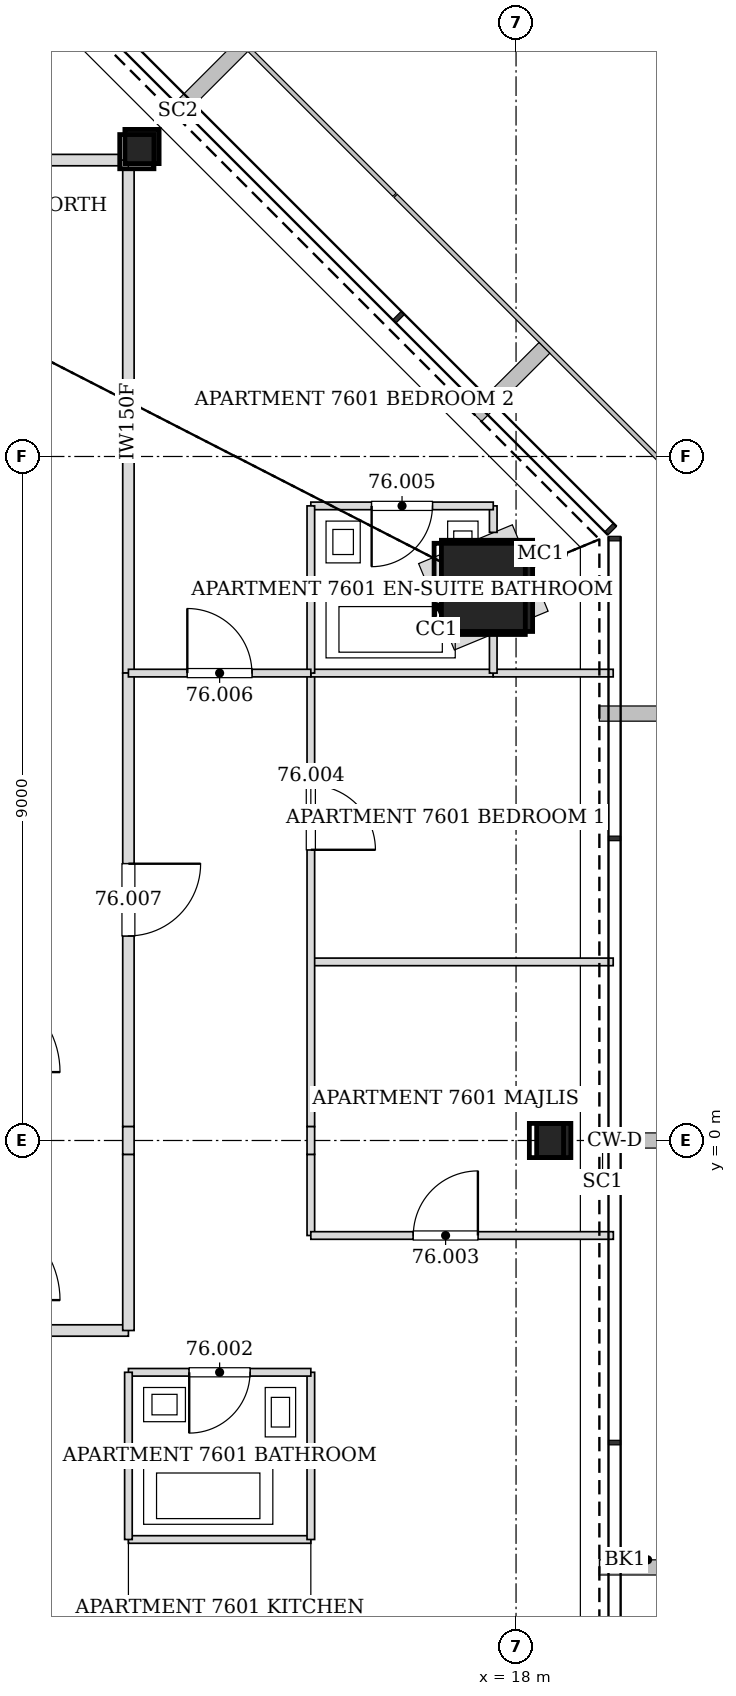
"""IFC4 building model, lengths in metres.
Left out: names, types, materials, properties, quantities, classifications, styles, units other than length and angle.
Written with IfcOpenShell. Run it as: python <this file> out.ifc"""

import sys

from ifc_helpers import new_model, si_unit, direction, frame, frame_2d, origin, origin_2d, place, context, subcontext, project, spatial, rectangle, hollow_rectangle, extrude, element, fill, save


model = new_model("IFC4")
c1 = context("Model", 3, precision=1e-05, world=origin(), true_north=direction((0.0, 1.0)))
c2 = subcontext(c1, "Body", "Model", "MODEL_VIEW")
j1 = project(units=[si_unit("LENGTHUNIT", "METRE"), si_unit("PLANEANGLEUNIT", "RADIAN")], contexts=[c1])
p1 = place(None, origin())
s1 = spatial("IfcSite", under=j1, at=p1, CompositionType="ELEMENT")
p2 = place(p1, origin())
s2 = spatial("IfcBuilding", under=s1, at=p2, CompositionType="ELEMENT")
p3 = place(p2, frame((0.0, 0.0, 308.2)))
s3 = spatial("IfcBuildingStorey", under=s2, at=p3, CompositionType="ELEMENT", Elevation=308.2)
p4 = place(p3, frame((17.618, 7.298, 0.0), z_axis=(-0.028277121884, -0.011698403216, 0.999531666202), x_axis=(0.382282742426, -0.924045401938, 0.0)))
e1 = element("IfcColumn", 1, at=p4, inside=s3, PredefinedType="COLUMN", context=c2, shape_type="SweptSolid", body=[
    extrude(hollow_rectangle(XDim=1.2, YDim=1.2, WallThickness=0.055, at=origin_2d()), origin(), (0.0, 0.0, 1.0), 3.402),
])
for number, where, z_axis, x_axis in (
    (2, (18.496, 0.0, 0.0), (-0.028, 0.0, 1.0), (0.0, -1.0, 0.0)),
    (3, (13.079, 13.079, 0.0), (-0.02, -0.02, 1.0), (0.707, -0.707, 0.0)),
):
    element("IfcColumn", number, at=place(p3, frame(where, z_axis=z_axis, x_axis=x_axis)), inside=s3, PredefinedType="COLUMN", context=c2, shape_type="SweptSolid", body=[
        extrude(hollow_rectangle(XDim=0.45, YDim=0.45, WallThickness=0.02, at=origin_2d()), origin(), (0.0, 0.0, 1.0), 3.402),
    ])
p5 = place(p3, frame((12.9, 6.149, 0.0), z_axis=(0.0, 0.0, 1.0), x_axis=(0.0, 1.0, 0.0)))
e4 = element("IfcWall", 4, at=p5, inside=s3, PredefinedType="PARTITIONING", context=c2, shape_type="SweptSolid", body=[
    extrude(rectangle(XDim=6.627, YDim=0.15, at=frame_2d((3.314, 0.0))), origin(), (0.0, 0.0, 1.0), 2.349),
])
p6 = place(p3, frame((11.25, -2.5, 0.0), z_axis=(0.0, 0.0, 1.0), x_axis=(1.0, 0.0, 0.0)))
e5 = element("IfcWall", 5, at=p6, inside=s3, PredefinedType="PARTITIONING", context=c2, shape_type="SweptSolid", body=[
    extrude(rectangle(XDim=1.65, YDim=0.15, at=frame_2d((0.825, 0.0))), origin(), (0.0, 0.0, 1.0), 3.2),
])
p7 = place(p3, frame((12.9, -2.5, 0.0), z_axis=(0.0, 0.0, 1.0), x_axis=(0.0, 1.0, 0.0)))
e6 = element("IfcWall", 6, at=p7, inside=s3, PredefinedType="PARTITIONING", context=c2, shape_type="SweptSolid", body=[
    extrude(rectangle(XDim=2.318, YDim=0.15, at=frame_2d((1.159, 0.0))), origin(), (0.0, 0.0, 1.0), 3.2),
])
p8 = place(p3, frame((12.9, 0.182, 0.0), z_axis=(0.0, 0.0, 1.0), x_axis=(0.0, 1.0, 0.0)))
e7 = element("IfcWall", 7, at=p8, inside=s3, PredefinedType="PARTITIONING", context=c2, shape_type="SweptSolid", body=[
    extrude(rectangle(XDim=5.969, YDim=0.15, at=frame_2d((2.984, 0.0))), origin(), (0.0, 0.0, 1.0), 3.2),
])
p9 = place(p8, frame((2.509, 0.0, 0.0)))
e8 = element("IfcOpeningElement", 8, at=p9, cuts=e7, PredefinedType="OPENING", context=c2, shape_type="SweptSolid", body=[
    extrude(rectangle(XDim=0.95, YDim=2.1, at=frame_2d((0.475, 1.05))), frame((0.0, 0.085, 0.0), z_axis=(0.0, -1.0, 0.0), x_axis=(1.0, 0.0, 0.0)), (0.0, 0.0, 1.0), 0.17),
])
p10 = place(p3, frame((12.9, -0.182, 0.0), z_axis=(0.0, 0.0, 1.0), x_axis=(0.0, 1.0, 0.0)))
e9 = element("IfcWall", 9, at=p10, inside=s3, PredefinedType="PARTITIONING", context=c2, shape_type="SweptSolid", body=[
    extrude(rectangle(XDim=0.365, YDim=0.15, at=frame_2d((0.182, 0.0))), origin(), (0.0, 0.0, 1.0), 2.268),
])
p11 = place(p3, frame((12.776, 12.9, 0.0), z_axis=(0.0, 0.0, 1.0), x_axis=(-1.0, 0.0, 0.0)))
e10 = element("IfcWall", 10, at=p11, inside=s3, PredefinedType="PARTITIONING", context=c2, shape_type="SweptSolid", body=[
    extrude(rectangle(XDim=6.627, YDim=0.15, at=frame_2d((3.314, 0.0))), origin(), (0.0, 0.0, 1.0), 2.349),
])
p12 = place(p3, frame((15.3, -5.25, 0.0), z_axis=(0.0, 0.0, 1.0), x_axis=(-1.0, 0.0, 0.0)))
e11 = element("IfcWall", 11, at=p12, inside=s3, PredefinedType="PARTITIONING", context=c2, shape_type="SweptSolid", body=[
    extrude(rectangle(XDim=2.4, YDim=0.1, at=frame_2d((1.2, 0.0))), origin(), (0.0, 0.0, 1.0), 2.588),
])
p13 = place(p3, frame((15.3, -5.25, 0.0), z_axis=(0.0, 0.0, 1.0), x_axis=(0.0, 1.0, 0.0)))
e12 = element("IfcWall", 12, at=p13, inside=s3, PredefinedType="PARTITIONING", context=c2, shape_type="SweptSolid", body=[
    extrude(rectangle(XDim=2.2, YDim=0.1, at=frame_2d((1.1, 0.0))), origin(), (0.0, 0.0, 1.0), 3.2),
])
p14 = place(p3, frame((15.3, -3.05, 0.0), z_axis=(0.0, 0.0, 1.0), x_axis=(-1.0, 0.0, 0.0)))
e13 = element("IfcWall", 13, at=p14, inside=s3, PredefinedType="PARTITIONING", context=c2, shape_type="SweptSolid", body=[
    extrude(rectangle(XDim=2.4, YDim=0.1, at=frame_2d((1.2, 0.0))), origin(), (0.0, 0.0, 1.0), 2.588),
])
p15 = place(p14, frame((0.8, 0.0, 0.0)))
e14 = element("IfcOpeningElement", 14, at=p15, cuts=e13, PredefinedType="OPENING", context=c2, shape_type="SweptSolid", body=[
    extrude(rectangle(XDim=0.8, YDim=2.1, at=frame_2d((0.4, 1.05))), frame((0.0, 0.06, 0.0), z_axis=(0.0, -1.0, 0.0), x_axis=(1.0, 0.0, 0.0)), (0.0, 0.0, 1.0), 0.12),
])
p16 = place(p3, frame((12.9, -3.05, 0.0), z_axis=(0.0, 0.0, 1.0), x_axis=(0.0, -1.0, 0.0)))
e15 = element("IfcWall", 15, at=p16, inside=s3, PredefinedType="PARTITIONING", context=c2, shape_type="SweptSolid", body=[
    extrude(rectangle(XDim=2.2, YDim=0.1, at=frame_2d((1.1, 0.0))), origin(), (0.0, 0.0, 1.0), 3.2),
])
p17 = place(p3, frame((19.278, 2.35, 0.0), z_axis=(0.0, 0.0, 1.0), x_axis=(-1.0, 0.0, 0.0)))
e16 = element("IfcWall", 16, at=p17, inside=s3, PredefinedType="PARTITIONING", context=c2, shape_type="SweptSolid", body=[
    extrude(rectangle(XDim=3.978, YDim=0.1, at=frame_2d((1.989, 0.0))), origin(), (0.0, 0.0, 1.0), 2.657),
])
p18 = place(p3, frame((15.3, 0.182, 0.0), z_axis=(0.0, 0.0, 1.0), x_axis=(0.0, 1.0, 0.0)))
e17 = element("IfcWall", 17, at=p18, inside=s3, PredefinedType="PARTITIONING", context=c2, shape_type="SweptSolid", body=[
    extrude(rectangle(XDim=5.968, YDim=0.1, at=frame_2d((2.984, 0.0))), origin(), (0.0, 0.0, 1.0), 3.2),
])
p19 = place(p18, frame((3.643, 0.0, 0.0)))
e18 = element("IfcOpeningElement", 18, at=p19, cuts=e17, PredefinedType="OPENING", context=c2, shape_type="SweptSolid", body=[
    extrude(rectangle(XDim=0.85, YDim=2.1, at=frame_2d((0.425, 1.05))), frame((0.0, 0.06, 0.0), z_axis=(0.0, -1.0, 0.0), x_axis=(1.0, 0.0, 0.0)), (0.0, 0.0, 1.0), 0.12),
])
p20 = place(p3, frame((15.3, -0.182, 0.0), z_axis=(0.0, 0.0, 1.0), x_axis=(0.0, -1.0, 0.0)))
e19 = element("IfcWall", 19, at=p20, inside=s3, PredefinedType="PARTITIONING", context=c2, shape_type="SweptSolid", body=[
    extrude(rectangle(XDim=1.068, YDim=0.1, at=frame_2d((0.534, 0.0))), origin(), (0.0, 0.0, 1.0), 3.2),
])
p21 = place(p3, frame((15.3, 0.182, 0.0), z_axis=(0.0, 0.0, 1.0), x_axis=(0.0, -1.0, 0.0)))
e20 = element("IfcWall", 20, at=p21, inside=s3, PredefinedType="PARTITIONING", context=c2, shape_type="SweptSolid", body=[
    extrude(rectangle(XDim=0.365, YDim=0.1, at=frame_2d((0.182, 0.0))), origin(), (0.0, 0.0, 1.0), 2.268),
])
p22 = place(p3, frame((15.3, -1.25, 0.0), z_axis=(0.0, 0.0, 1.0), x_axis=(1.0, 0.0, 0.0)))
e21 = element("IfcWall", 21, at=p22, inside=s3, PredefinedType="PARTITIONING", context=c2, shape_type="SweptSolid", body=[
    extrude(rectangle(XDim=3.98, YDim=0.1, at=frame_2d((1.99, 0.0))), origin(), (0.0, 0.0, 1.0), 2.657),
])
p23 = place(p22, frame((1.348, 0.0, 0.0)))
e22 = element("IfcOpeningElement", 22, at=p23, cuts=e21, PredefinedType="OPENING", context=c2, shape_type="SweptSolid", body=[
    extrude(rectangle(XDim=0.85, YDim=2.1, at=frame_2d((0.425, 1.05))), frame((0.0, 0.06, 0.0), z_axis=(0.0, -1.0, 0.0), x_axis=(1.0, 0.0, 0.0)), (0.0, 0.0, 1.0), 0.12),
])
p24 = place(p3, frame((17.701, 6.15, 0.0), z_axis=(0.0, 0.0, 1.0), x_axis=(-1.0, 0.0, 0.0)))
e23 = element("IfcWall", 23, at=p24, inside=s3, PredefinedType="PARTITIONING", context=c2, shape_type="SweptSolid", body=[
    extrude(rectangle(XDim=2.401, YDim=0.1, at=frame_2d((1.2, 0.0))), origin(), (0.0, 0.0, 1.0), 2.657),
])
p25 = place(p3, frame((19.278, 6.15, 0.0), z_axis=(0.0, 0.0, 1.0), x_axis=(-1.0, 0.0, 0.0)))
e24 = element("IfcWall", 24, at=p25, inside=s3, PredefinedType="PARTITIONING", context=c2, shape_type="SweptSolid", body=[
    extrude(rectangle(XDim=1.579, YDim=0.1, at=frame_2d((0.79, 0.0))), origin(), (0.0, 0.0, 1.0), 2.664),
])
p26 = place(p3, frame((17.7, 6.15, 0.0), z_axis=(0.0, 0.0, 1.0), x_axis=(0.0, 1.0, 0.0)))
e25 = element("IfcWall", 25, at=p26, inside=s3, PredefinedType="PARTITIONING", context=c2, shape_type="SweptSolid", body=[
    extrude(rectangle(XDim=0.512, YDim=0.1, at=frame_2d((0.256, 0.0))), origin(), (0.0, 0.0, 1.0), 2.664),
])
p27 = place(p3, frame((17.7, 8.002, 0.0), z_axis=(0.0, 0.0, 1.0), x_axis=(0.0, 1.0, 0.0)))
e26 = element("IfcWall", 26, at=p27, inside=s3, PredefinedType="PARTITIONING", context=c2, shape_type="SweptSolid", body=[
    extrude(rectangle(XDim=0.348, YDim=0.1, at=frame_2d((0.174, 0.0))), origin(), (0.0, 0.0, 1.0), 3.2),
])
p28 = place(p3, frame((17.7, 8.35, 0.0), z_axis=(0.0, 0.0, 1.0), x_axis=(-1.0, 0.0, 0.0)))
e27 = element("IfcWall", 27, at=p28, inside=s3, PredefinedType="PARTITIONING", context=c2, shape_type="SweptSolid", body=[
    extrude(rectangle(XDim=2.4, YDim=0.1, at=frame_2d((1.2, 0.0))), origin(), (0.0, 0.0, 1.0), 2.349),
])
p29 = place(p28, frame((0.8, 0.0, 0.0)))
e28 = element("IfcOpeningElement", 28, at=p29, cuts=e27, PredefinedType="OPENING", context=c2, shape_type="SweptSolid", body=[
    extrude(rectangle(XDim=0.8, YDim=2.1, at=frame_2d((0.4, 1.05))), frame((0.0, 0.06, 0.0), z_axis=(0.0, -1.0, 0.0), x_axis=(1.0, 0.0, 0.0)), (0.0, 0.0, 1.0), 0.12),
])
p30 = place(p3, frame((15.3, 8.35, 0.0), z_axis=(0.0, 0.0, 1.0), x_axis=(0.0, -1.0, 0.0)))
e29 = element("IfcWall", 29, at=p30, inside=s3, PredefinedType="PARTITIONING", context=c2, shape_type="SweptSolid", body=[
    extrude(rectangle(XDim=2.2, YDim=0.1, at=frame_2d((1.1, 0.0))), origin(), (0.0, 0.0, 1.0), 2.349),
])
p31 = place(p3, frame((12.9, 6.15, 0.0), z_axis=(0.0, 0.0, 1.0), x_axis=(1.0, 0.0, 0.0)))
e30 = element("IfcWall", 30, at=p31, inside=s3, PredefinedType="PARTITIONING", context=c2, shape_type="SweptSolid", body=[
    extrude(rectangle(XDim=2.4, YDim=0.1, at=frame_2d((1.2, 0.0))), origin(), (0.0, 0.0, 1.0), 2.588),
])
p32 = place(p31, frame((0.775, 0.0, 0.0)))
e31 = element("IfcOpeningElement", 31, at=p32, cuts=e30, PredefinedType="OPENING", context=c2, shape_type="SweptSolid", body=[
    extrude(rectangle(XDim=0.85, YDim=2.1, at=frame_2d((0.425, 1.05))), frame((0.0, 0.06, 0.0), z_axis=(0.0, -1.0, 0.0), x_axis=(1.0, 0.0, 0.0)), (0.0, 0.0, 1.0), 0.12),
])
p33 = place(p15, origin())
e32 = element("IfcDoor", 32, at=p33, inside=s3, OperationType="SINGLE_SWING_RIGHT", PredefinedType="DOOR", context=c2, shape_type="SweptSolid", body=[
    extrude(rectangle(XDim=0.8, YDim=2.1, at=frame_2d((0.4, 1.05))), frame((0.0, 0.025, 0.0), z_axis=(0.0, -1.0, 0.0), x_axis=(1.0, 0.0, 0.0)), (0.0, 0.0, 1.0), 0.05),
])
fill(e14, e32)
p34 = place(p23, origin())
e33 = element("IfcDoor", 33, at=p34, inside=s3, OperationType="SINGLE_SWING_RIGHT", PredefinedType="DOOR", context=c2, shape_type="SweptSolid", body=[
    extrude(rectangle(XDim=0.85, YDim=2.1, at=frame_2d((0.425, 1.05))), frame((0.0, 0.025, 0.0), z_axis=(0.0, -1.0, 0.0), x_axis=(1.0, 0.0, 0.0)), (0.0, 0.0, 1.0), 0.05),
])
fill(e22, e33)
p35 = place(p19, frame((0.85, 0.0, 0.0), z_axis=(0.0, 0.0, 1.0), x_axis=(-1.0, 0.0, 0.0)))
e34 = element("IfcDoor", 34, at=p35, inside=s3, OperationType="SINGLE_SWING_RIGHT", PredefinedType="DOOR", context=c2, shape_type="SweptSolid", body=[
    extrude(rectangle(XDim=0.85, YDim=2.1, at=frame_2d((0.425, 1.05))), frame((0.0, 0.025, 0.0), z_axis=(0.0, -1.0, 0.0), x_axis=(1.0, 0.0, 0.0)), (0.0, 0.0, 1.0), 0.05),
])
fill(e18, e34)
p36 = place(p29, origin())
e35 = element("IfcDoor", 35, at=p36, inside=s3, OperationType="SINGLE_SWING_RIGHT", PredefinedType="DOOR", context=c2, shape_type="SweptSolid", body=[
    extrude(rectangle(XDim=0.8, YDim=2.1, at=frame_2d((0.4, 1.05))), frame((0.0, 0.025, 0.0), z_axis=(0.0, -1.0, 0.0), x_axis=(1.0, 0.0, 0.0)), (0.0, 0.0, 1.0), 0.05),
])
fill(e28, e35)
p37 = place(p32, origin())
e36 = element("IfcDoor", 36, at=p37, inside=s3, OperationType="SINGLE_SWING_LEFT", PredefinedType="DOOR", context=c2, shape_type="SweptSolid", body=[
    extrude(rectangle(XDim=0.85, YDim=2.1, at=frame_2d((0.425, 1.05))), frame((0.0, 0.025, 0.0), z_axis=(0.0, -1.0, 0.0), x_axis=(1.0, 0.0, 0.0)), (0.0, 0.0, 1.0), 0.05),
])
fill(e31, e36)
p38 = place(p9, frame((0.95, 0.0, 0.0), z_axis=(0.0, 0.0, 1.0), x_axis=(-1.0, 0.0, 0.0)))
e37 = element("IfcDoor", 37, at=p38, inside=s3, OperationType="SINGLE_SWING_LEFT", PredefinedType="DOOR", context=c2, shape_type="SweptSolid", body=[
    extrude(rectangle(XDim=0.95, YDim=2.1, at=frame_2d((0.475, 1.05))), frame((0.0, 0.025, 0.0), z_axis=(0.0, -1.0, 0.0), x_axis=(1.0, 0.0, 0.0)), (0.0, 0.0, 1.0), 0.05),
])
fill(e8, e37)
save(model, sys.argv[1])
